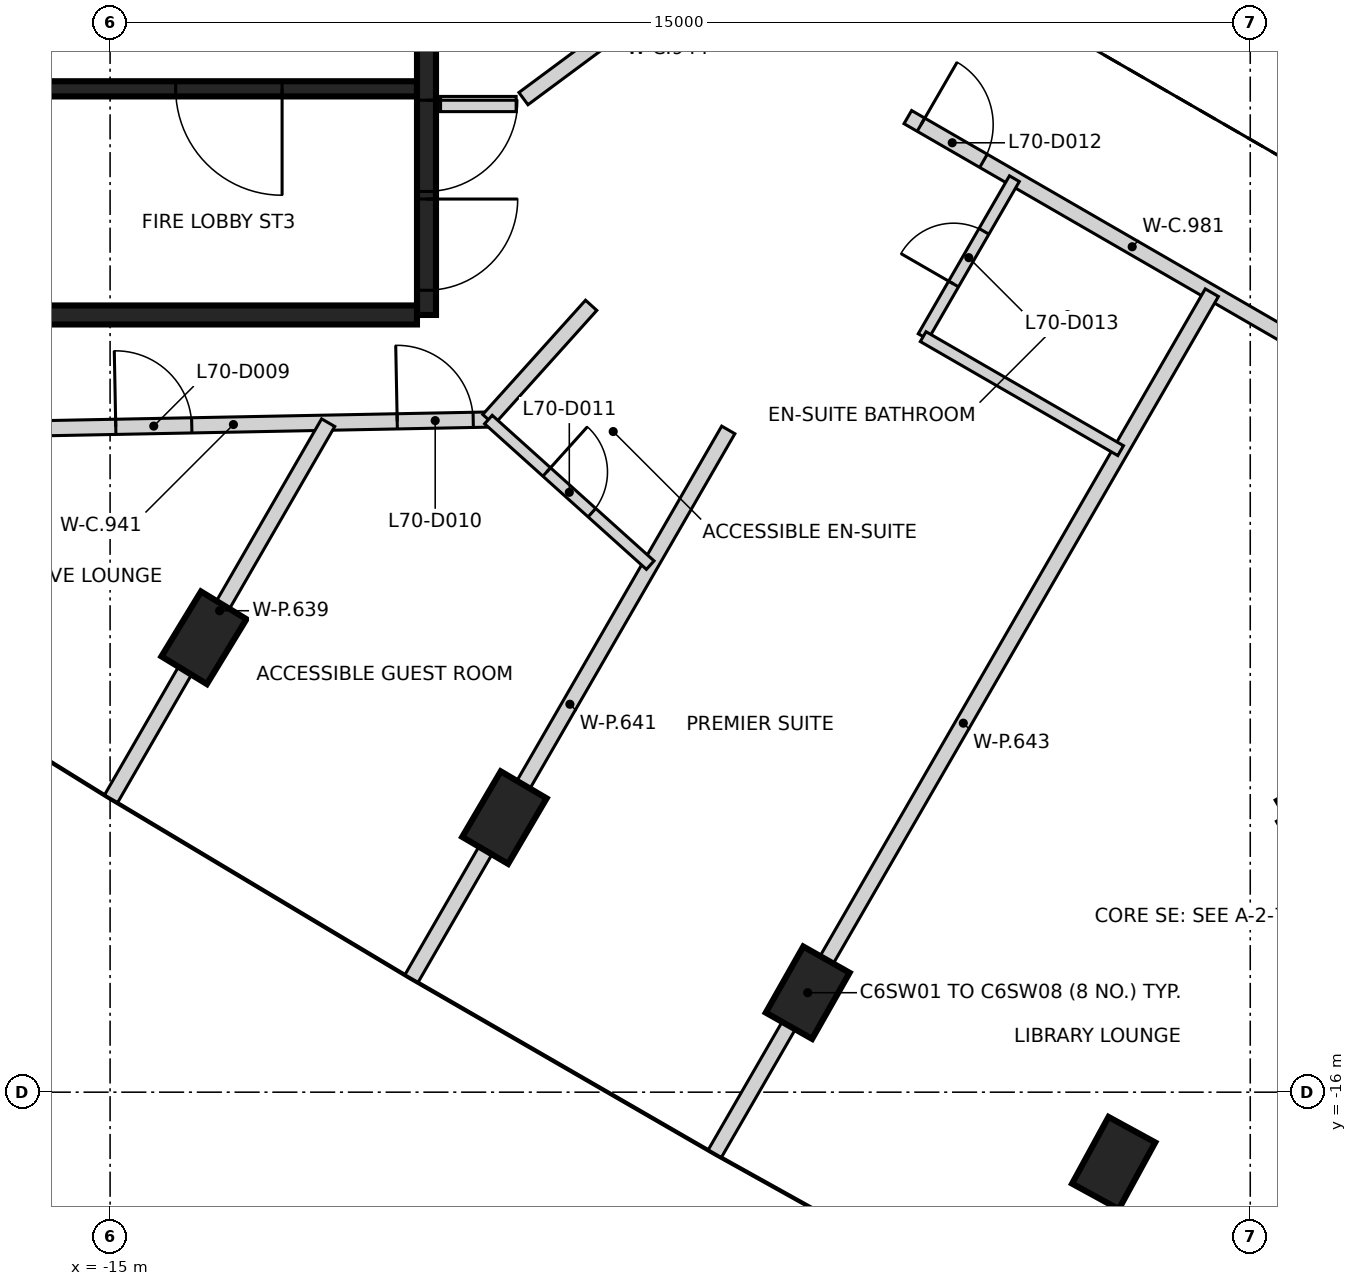
"""IFC4 building model, lengths in metres.
Left out: names, types, materials, properties, quantities, classifications, styles, units other than length and angle.
Written with IfcOpenShell. Run it as: python <this file> out.ifc"""

import sys

from ifc_helpers import new_model, si_unit, direction, frame, frame_2d, origin, origin_2d, place, context, subcontext, project, spatial, rectangle, extrude, element, fill, save


model = new_model("IFC4")
c1 = context("Model", 3, precision=1e-05, world=origin(), true_north=direction((0.0, 1.0)))
c2 = subcontext(c1, "Body", "Model", "MODEL_VIEW")
j1 = project(units=[si_unit("LENGTHUNIT", "METRE"), si_unit("PLANEANGLEUNIT", "RADIAN")], contexts=[c1])
p1 = place(None, origin())
s1 = spatial("IfcSite", under=j1, at=p1, CompositionType="ELEMENT")
p2 = place(p1, origin())
s2 = spatial("IfcBuilding", under=s1, at=p2, CompositionType="ELEMENT")
p3 = place(p2, frame((0.0, 0.0, 276.6)))
s3 = spatial("IfcBuildingStorey", under=s2, at=p3, CompositionType="ELEMENT", Elevation=276.6)
for number, where, z_axis, x_axis in (
    (1, (-13.765, -10.022, -0.35), (0.0, 0.0, 1.0), (0.52, 0.854, 0.0)),
    (2, (-9.812, -12.388, -0.35), (0.0, 0.0, 1.0), (0.507, 0.862, 0.0)),
    (3, (-5.822, -14.691, -0.35), (0.0, 0.0, 1.0), (0.493, 0.87, 0.0)),
    (4, (-1.797, -16.932, -0.35), (0.0, 0.0, 1.0), (0.479, 0.878, 0.0)),
):
    element("IfcColumn", number, at=place(p3, frame(where, z_axis=z_axis, x_axis=x_axis)), inside=s3, PredefinedType="COLUMN", context=c2, shape_type="SweptSolid", body=[
        extrude(rectangle(XDim=1.0, YDim=0.7, at=origin_2d()), origin(), (0.0, 0.0, 1.0), 3.6),
    ])
p4 = place(p3, frame((-10.837, 5.775, 0.0), z_axis=(0.0, 0.0, 1.0), x_axis=(0.0, -1.0, 0.0)))
e5 = element("IfcWall", 5, at=p4, inside=s3, PredefinedType="SHEAR", context=c2, shape_type="SweptSolid", body=[
    extrude(rectangle(XDim=11.55, YDim=0.25, at=frame_2d((5.775, 0.0))), origin(), (0.0, 0.0, 1.0), 3.25),
])
p5 = place(p4, frame((10.025, 0.0, 0.0)))
e6 = element("IfcOpeningElement", 6, at=p5, cuts=e5, PredefinedType="OPENING", context=c2, shape_type="SweptSolid", body=[
    extrude(rectangle(XDim=1.2, YDim=2.1, at=frame_2d((0.6, 1.05))), frame((0.0, 0.135, 0.0), z_axis=(0.0, -1.0, 0.0), x_axis=(1.0, 0.0, 0.0)), (0.0, 0.0, 1.0), 0.27),
])
p6 = place(p4, frame((8.725, 0.0, 0.0)))
e7 = element("IfcOpeningElement", 7, at=p6, cuts=e5, PredefinedType="OPENING", context=c2, shape_type="SweptSolid", body=[
    extrude(rectangle(XDim=1.2, YDim=2.1, at=frame_2d((0.6, 1.05))), frame((0.0, 0.135, 0.0), z_axis=(0.0, -1.0, 0.0), x_axis=(1.0, 0.0, 0.0)), (0.0, 0.0, 1.0), 0.27),
])
p7 = place(p3, frame((-10.963, -5.775, 0.0), z_axis=(0.0, 0.0, 1.0), x_axis=(-1.0, 0.0, 0.0)))
e8 = element("IfcWall", 8, at=p7, inside=s3, PredefinedType="SHEAR", context=c2, shape_type="SweptSolid", body=[
    extrude(rectangle(XDim=5.225, YDim=0.25, at=frame_2d((2.612, 0.0))), origin(), (0.0, 0.0, 1.0), 3.25),
])
p8 = place(p3, frame((-10.963, -2.8, 0.0), z_axis=(0.0, 0.0, 1.0), x_axis=(-1.0, 0.0, 0.0)))
e9 = element("IfcWall", 9, at=p8, inside=s3, PredefinedType="SHEAR", context=c2, shape_type="SweptSolid", body=[
    extrude(rectangle(XDim=5.098, YDim=0.2, at=frame_2d((2.549, 0.0))), origin(), (0.0, 0.0, 1.0), 3.25),
])
p9 = place(p8, frame((1.774, 0.0, 0.0)))
e10 = element("IfcOpeningElement", 10, at=p9, cuts=e9, PredefinedType="OPENING", context=c2, shape_type="SweptSolid", body=[
    extrude(rectangle(XDim=1.4, YDim=2.1, at=frame_2d((0.7, 1.05))), frame((0.0, 0.11, 0.0), z_axis=(0.0, -1.0, 0.0), x_axis=(1.0, 0.0, 0.0)), (0.0, 0.0, 1.0), 0.22),
])
p10 = place(p3, frame((0.417, -12.273, 0.0), z_axis=(0.0, 0.0, 1.0), x_axis=(0.866021906294, 0.500006057782, 0.0)))
e11 = element("IfcWall", 11, at=p10, inside=s3, PredefinedType="SHEAR", context=c2, shape_type="SweptSolid", body=[
    extrude(rectangle(XDim=11.55, YDim=0.25, at=frame_2d((5.775, 0.0))), origin(), (0.0, 0.0, 1.0), 3.25),
])
p11 = place(p10, frame((10.025, 0.0, 0.0)))
e12 = element("IfcOpeningElement", 12, at=p11, cuts=e11, PredefinedType="OPENING", context=c2, shape_type="SweptSolid", body=[
    extrude(rectangle(XDim=1.2, YDim=2.1, at=frame_2d((0.6, 1.05))), frame((0.0, 0.135, 0.0), z_axis=(0.0, -1.0, 0.0), x_axis=(1.0, 0.0, 0.0)), (0.0, 0.0, 1.0), 0.27),
])
p12 = place(p10, frame((8.725, 0.0, 0.0)))
e13 = element("IfcOpeningElement", 13, at=p12, cuts=e11, PredefinedType="OPENING", context=c2, shape_type="SweptSolid", body=[
    extrude(rectangle(XDim=1.2, YDim=2.1, at=frame_2d((0.6, 1.05))), frame((0.0, 0.135, 0.0), z_axis=(0.0, -1.0, 0.0), x_axis=(1.0, 0.0, 0.0)), (0.0, 0.0, 1.0), 0.27),
])
p13 = place(p3, frame((-16.732, -7.282, 0.0), z_axis=(0.0, 0.0, 1.0), x_axis=(0.999809829903, 0.019501385329, 0.0)))
e14 = element("IfcWall", 14, at=p13, inside=s3, PredefinedType="PARTITIONING", context=c2, shape_type="SweptSolid", body=[
    extrude(rectangle(XDim=6.71, YDim=0.2, at=frame_2d((3.355, 0.0))), origin(), (0.0, 0.0, 1.0), 3.25),
])
p14 = place(p13, frame((1.807, 0.0, 0.0)))
e15 = element("IfcOpeningElement", 15, at=p14, cuts=e14, PredefinedType="OPENING", context=c2, shape_type="SweptSolid", body=[
    extrude(rectangle(XDim=1.0, YDim=2.1, at=frame_2d((0.5, 1.05))), frame((0.0, 0.11, 0.0), z_axis=(0.0, -1.0, 0.0), x_axis=(1.0, 0.0, 0.0)), (0.0, 0.0, 1.0), 0.22),
])
p15 = place(p13, frame((5.51, 0.0, 0.0)))
e16 = element("IfcOpeningElement", 16, at=p15, cuts=e14, PredefinedType="OPENING", context=c2, shape_type="SweptSolid", body=[
    extrude(rectangle(XDim=1.0, YDim=2.1, at=frame_2d((0.5, 1.05))), frame((0.0, 0.11, 0.0), z_axis=(0.0, -1.0, 0.0), x_axis=(1.0, 0.0, 0.0)), (0.0, 0.0, 1.0), 0.22),
])
p16 = place(p3, frame((-10.652, -3.0, 0.0), z_axis=(0.0, 0.0, 1.0), x_axis=(1.0, 0.0, 0.0)))
e17 = element("IfcWall", 17, at=p16, inside=s3, PredefinedType="PARTITIONING", context=c2, shape_type="SweptSolid", body=[
    extrude(rectangle(XDim=0.994, YDim=0.2, at=frame_2d((0.497, 0.0))), origin(), (0.0, 0.0, 1.0), 3.25),
])
p17 = place(p3, frame((-10.023, -7.151, 0.0), z_axis=(0.0, 0.0, 1.0), x_axis=(0.668804583793, 0.743438248073, 0.0)))
e18 = element("IfcWall", 18, at=p17, inside=s3, PredefinedType="PARTITIONING", context=c2, shape_type="SweptSolid", body=[
    extrude(rectangle(XDim=2.021, YDim=0.2, at=frame_2d((1.011, 0.0))), origin(), (0.0, 0.0, 1.0), 3.25),
])
p18 = place(p3, frame((-7.115, -1.115, 0.0), z_axis=(0.0, 0.0, 1.0), x_axis=(-0.803344165632, -0.595515030495, 0.0)))
e19 = element("IfcWall", 19, at=p18, inside=s3, PredefinedType="PARTITIONING", context=c2, shape_type="SweptSolid", body=[
    extrude(rectangle(XDim=3.046, YDim=0.2, at=frame_2d((1.523, 0.0))), origin(), (0.0, 0.0, 1.0), 3.25),
])
p19 = place(p3, frame((-4.505, -3.172, 0.0), z_axis=(0.0, 0.0, 1.0), x_axis=(0.865815783666, -0.500362897061, 0.0)))
e20 = element("IfcWall", 20, at=p19, inside=s3, PredefinedType="PARTITIONING", context=c2, shape_type="SweptSolid", body=[
    extrude(rectangle(XDim=6.819, YDim=0.2, at=frame_2d((3.409, 0.0))), origin(), (0.0, 0.0, 1.0), 3.25),
])
p20 = place(p19, frame((0.2, 0.0, 0.0)))
e21 = element("IfcOpeningElement", 21, at=p20, cuts=e20, PredefinedType="OPENING", context=c2, shape_type="SweptSolid", body=[
    extrude(rectangle(XDim=0.95, YDim=2.1, at=frame_2d((0.475, 1.05))), frame((0.0, 0.11, 0.0), z_axis=(0.0, -1.0, 0.0), x_axis=(1.0, 0.0, 0.0)), (0.0, 0.0, 1.0), 0.22),
])
p21 = place(p3, frame((-14.987, -12.14, 0.0), z_axis=(0.0, 0.0, 1.0), x_axis=(0.499912336857, 0.866076010208, 0.0)))
e22 = element("IfcWall", 22, at=p21, inside=s3, PredefinedType="PARTITIONING", context=c2, shape_type="SweptSolid", body=[
    extrude(rectangle(XDim=5.713, YDim=0.2, at=frame_2d((2.857, 0.0))), origin(), (0.0, 0.0, 1.0), 3.25),
])
p22 = place(p3, frame((-11.035, -14.505, 0.0), z_axis=(0.0, 0.0, 1.0), x_axis=(0.50003941366, 0.866002647102, 0.0)))
e23 = element("IfcWall", 23, at=p22, inside=s3, PredefinedType="PARTITIONING", context=c2, shape_type="SweptSolid", body=[
    extrude(rectangle(XDim=8.334, YDim=0.2, at=frame_2d((4.167, 0.0))), origin(), (0.0, 0.0, 1.0), 3.25),
])
p23 = place(p3, frame((-7.044, -16.809, 0.0), z_axis=(0.0, 0.0, 1.0), x_axis=(0.499969679245, 0.866042908773, 0.0)))
e24 = element("IfcWall", 24, at=p23, inside=s3, PredefinedType="PARTITIONING", context=c2, shape_type="SweptSolid", body=[
    extrude(rectangle(XDim=13.079, YDim=0.2, at=frame_2d((6.54, 0.0))), origin(), (0.0, 0.0, 1.0), 3.25),
])
p24 = place(p3, frame((-10.023, -7.151, 0.0), z_axis=(0.0, 0.0, 1.0), x_axis=(0.743463699468, -0.668776291127, 0.0)))
e25 = element("IfcWall", 25, at=p24, inside=s3, PredefinedType="PARTITIONING", context=c2, shape_type="SweptSolid", body=[
    extrude(rectangle(XDim=2.864, YDim=0.15, at=frame_2d((1.432, 0.0))), origin(), (0.0, 0.0, 1.0), 3.25),
])
p25 = place(p24, frame((1.031, 0.0, 0.0)))
e26 = element("IfcOpeningElement", 26, at=p25, cuts=e25, PredefinedType="OPENING", context=c2, shape_type="SweptSolid", body=[
    extrude(rectangle(XDim=0.8, YDim=2.1, at=frame_2d((0.4, 1.05))), frame((0.0, 0.085, 0.0), z_axis=(0.0, -1.0, 0.0), x_axis=(1.0, 0.0, 0.0)), (0.0, 0.0, 1.0), 0.17),
])
p26 = place(p3, frame((-4.303, -6.06, 0.0), z_axis=(0.0, 0.0, 1.0), x_axis=(0.500045362686, 0.865999212041, 0.0)))
e27 = element("IfcWall", 27, at=p26, inside=s3, PredefinedType="PARTITIONING", context=c2, shape_type="SweptSolid", body=[
    extrude(rectangle(XDim=2.4, YDim=0.15, at=frame_2d((1.2, 0.0))), origin(), (0.0, 0.0, 1.0), 3.25),
])
p27 = place(p26, frame((0.8, 0.0, 0.0)))
e28 = element("IfcOpeningElement", 28, at=p27, cuts=e27, PredefinedType="OPENING", context=c2, shape_type="SweptSolid", body=[
    extrude(rectangle(XDim=0.8, YDim=2.1, at=frame_2d((0.4, 1.05))), frame((0.0, 0.085, 0.0), z_axis=(0.0, -1.0, 0.0), x_axis=(1.0, 0.0, 0.0)), (0.0, 0.0, 1.0), 0.17),
])
p28 = place(p3, frame((-4.303, -6.06, 0.0), z_axis=(0.0, 0.0, 1.0), x_axis=(0.866010750942, -0.50002537861, 0.0)))
e29 = element("IfcWall", 29, at=p28, inside=s3, PredefinedType="PARTITIONING", context=c2, shape_type="SweptSolid", body=[
    extrude(rectangle(XDim=3.0, YDim=0.15, at=frame_2d((1.5, 0.0))), origin(), (0.0, 0.0, 1.0), 3.25),
])
p29 = place(p5, origin())
e30 = element("IfcDoor", 30, at=p29, inside=s3, OperationType="SINGLE_SWING_LEFT", PredefinedType="DOOR", context=c2, shape_type="SweptSolid", body=[
    extrude(rectangle(XDim=1.2, YDim=2.1, at=frame_2d((0.6, 1.05))), frame((0.0, 0.025, 0.0), z_axis=(0.0, -1.0, 0.0), x_axis=(1.0, 0.0, 0.0)), (0.0, 0.0, 1.0), 0.05),
])
fill(e6, e30)
p30 = place(p6, origin())
e31 = element("IfcDoor", 31, at=p30, inside=s3, OperationType="SINGLE_SWING_RIGHT", PredefinedType="DOOR", context=c2, shape_type="SweptSolid", body=[
    extrude(rectangle(XDim=1.2, YDim=2.1, at=frame_2d((0.6, 1.05))), frame((0.0, 0.025, 0.0), z_axis=(0.0, -1.0, 0.0), x_axis=(1.0, 0.0, 0.0)), (0.0, 0.0, 1.0), 0.05),
])
fill(e7, e31)
p31 = place(p9, origin())
e32 = element("IfcDoor", 32, at=p31, inside=s3, OperationType="SINGLE_SWING_RIGHT", PredefinedType="DOOR", context=c2, shape_type="SweptSolid", body=[
    extrude(rectangle(XDim=1.4, YDim=2.1, at=frame_2d((0.7, 1.05))), frame((0.0, 0.025, 0.0), z_axis=(0.0, -1.0, 0.0), x_axis=(1.0, 0.0, 0.0)), (0.0, 0.0, 1.0), 0.05),
])
fill(e10, e32)
p32 = place(p14, origin())
e33 = element("IfcDoor", 33, at=p32, inside=s3, OperationType="SINGLE_SWING_LEFT", PredefinedType="DOOR", context=c2, shape_type="SweptSolid", body=[
    extrude(rectangle(XDim=1.0, YDim=2.1, at=frame_2d((0.5, 1.05))), frame((0.0, 0.025, 0.0), z_axis=(0.0, -1.0, 0.0), x_axis=(1.0, 0.0, 0.0)), (0.0, 0.0, 1.0), 0.05),
])
fill(e15, e33)
p33 = place(p15, frame((1.0, 0.0, 0.0), z_axis=(0.0, 0.0, 1.0), x_axis=(-1.0, 0.0, 0.0)))
e34 = element("IfcDoor", 34, at=p33, inside=s3, OperationType="SINGLE_SWING_LEFT", PredefinedType="DOOR", context=c2, shape_type="SweptSolid", body=[
    extrude(rectangle(XDim=1.0, YDim=2.1, at=frame_2d((0.5, 1.05))), frame((0.0, 0.025, 0.0), z_axis=(0.0, -1.0, 0.0), x_axis=(1.0, 0.0, 0.0)), (0.0, 0.0, 1.0), 0.05),
])
fill(e16, e34)
p34 = place(p25, frame((0.8, 0.0, 0.0), z_axis=(0.0, 0.0, 1.0), x_axis=(-1.0, 0.0, 0.0)))
e35 = element("IfcDoor", 35, at=p34, inside=s3, OperationType="SINGLE_SWING_LEFT", PredefinedType="DOOR", context=c2, shape_type="SweptSolid", body=[
    extrude(rectangle(XDim=0.8, YDim=2.1, at=frame_2d((0.4, 1.05))), frame((0.0, 0.025, 0.0), z_axis=(0.0, -1.0, 0.0), x_axis=(1.0, 0.0, 0.0)), (0.0, 0.0, 1.0), 0.05),
])
fill(e26, e35)
p35 = place(p20, frame((0.95, 0.0, 0.0), z_axis=(0.0, 0.0, 1.0), x_axis=(-1.0, 0.0, 0.0)))
e36 = element("IfcDoor", 36, at=p35, inside=s3, OperationType="SINGLE_SWING_LEFT", PredefinedType="DOOR", context=c2, shape_type="SweptSolid", body=[
    extrude(rectangle(XDim=0.95, YDim=2.1, at=frame_2d((0.475, 1.05))), frame((0.0, 0.025, 0.0), z_axis=(0.0, -1.0, 0.0), x_axis=(1.0, 0.0, 0.0)), (0.0, 0.0, 1.0), 0.05),
])
fill(e21, e36)
p36 = place(p27, frame((0.8, 0.0, 0.0), z_axis=(0.0, 0.0, 1.0), x_axis=(-1.0, 0.0, 0.0)))
e37 = element("IfcDoor", 37, at=p36, inside=s3, OperationType="SINGLE_SWING_LEFT", PredefinedType="DOOR", context=c2, shape_type="SweptSolid", body=[
    extrude(rectangle(XDim=0.8, YDim=2.1, at=frame_2d((0.4, 1.05))), frame((0.0, 0.025, 0.0), z_axis=(0.0, -1.0, 0.0), x_axis=(1.0, 0.0, 0.0)), (0.0, 0.0, 1.0), 0.05),
])
fill(e28, e37)
save(model, sys.argv[1])
